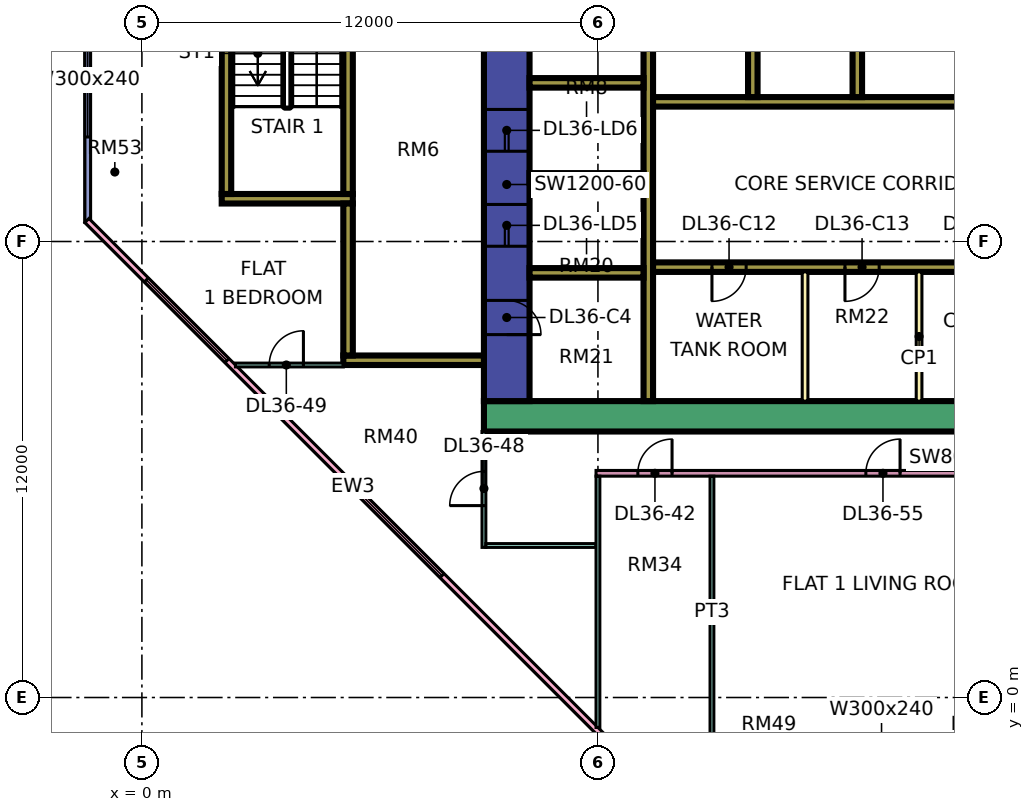
"""IFC4 building model, lengths in metres.
Left out: names, types, materials, properties, quantities, classifications, styles, units other than length and angle.
Written with IfcOpenShell. Run it as: python <this file> out.ifc"""

import sys

from ifc_helpers import new_model, si_unit, direction, frame, frame_2d, origin, place, context, subcontext, project, spatial, rectangle, extrude, element, fill, save


model = new_model("IFC4")
c1 = context("Model", 3, precision=1e-05, world=origin(), true_north=direction((0.0, 1.0)))
c2 = subcontext(c1, "Body", "Model", "MODEL_VIEW")
j1 = project(units=[si_unit("LENGTHUNIT", "METRE"), si_unit("PLANEANGLEUNIT", "RADIAN")], contexts=[c1])
p1 = place(None, origin())
s1 = spatial("IfcSite", under=j1, at=p1, CompositionType="ELEMENT")
p2 = place(p1, origin())
s2 = spatial("IfcBuilding", under=s1, at=p2, CompositionType="ELEMENT")
p3 = place(p2, frame((0.0, 0.0, 161.15)))
s3 = spatial("IfcBuildingStorey", under=s2, at=p3, CompositionType="ELEMENT", Elevation=161.15)
p4 = place(p3, frame((9.0, 7.4, 0.0), z_axis=(0.0, 0.0, 1.0), x_axis=(1.0, 0.0, 0.0)))
e1 = element("IfcWall", 1, at=p4, inside=s3, PredefinedType="SHEAR", context=c2, shape_type="SweptSolid", body=[
    extrude(rectangle(XDim=25.0, YDim=0.8, at=frame_2d((12.5, 0.0))), origin(), (0.0, 0.0, 1.0), 3.75),
])
p5 = place(p3, frame((9.6, 7.8, 0.0), z_axis=(0.0, 0.0, 1.0), x_axis=(0.0, 1.0, 0.0)))
e2 = element("IfcWall", 2, at=p5, inside=s3, PredefinedType="SHEAR", context=c2, shape_type="SweptSolid", body=[
    extrude(rectangle(XDim=11.4, YDim=1.2, at=frame_2d((5.7, 0.0))), origin(), (0.0, 0.0, 1.0), 3.75),
])
p6 = place(p5, frame((4.075, 0.0, 0.0)))
e3 = element("IfcOpeningElement", 3, at=p6, cuts=e2, PredefinedType="OPENING", context=c2, shape_type="SweptSolid", body=[
    extrude(rectangle(XDim=1.1, YDim=2.2, at=frame_2d((0.55, 1.1))), frame((0.0, 0.61, 0.0), z_axis=(0.0, -1.0, 0.0), x_axis=(1.0, 0.0, 0.0)), (0.0, 0.0, 1.0), 1.22),
])
p7 = place(p5, frame((6.575, 0.0, 0.0)))
e4 = element("IfcOpeningElement", 4, at=p7, cuts=e2, PredefinedType="OPENING", context=c2, shape_type="SweptSolid", body=[
    extrude(rectangle(XDim=1.1, YDim=2.2, at=frame_2d((0.55, 1.1))), frame((0.0, 0.61, 0.0), z_axis=(0.0, -1.0, 0.0), x_axis=(1.0, 0.0, 0.0)), (0.0, 0.0, 1.0), 1.22),
])
p8 = place(p5, frame((9.4, 0.0, 0.0)))
e5 = element("IfcOpeningElement", 5, at=p8, cuts=e2, PredefinedType="OPENING", context=c2, shape_type="SweptSolid", body=[
    extrude(rectangle(XDim=1.1, YDim=2.2, at=frame_2d((0.55, 1.1))), frame((0.0, 0.61, 0.0), z_axis=(0.0, -1.0, 0.0), x_axis=(1.0, 0.0, 0.0)), (0.0, 0.0, 1.0), 1.22),
])
p9 = place(p5, frame((1.75, 0.0, 0.0)))
e6 = element("IfcOpeningElement", 6, at=p9, cuts=e2, PredefinedType="OPENING", context=c2, shape_type="SweptSolid", body=[
    extrude(rectangle(XDim=0.9, YDim=2.1, at=frame_2d((0.45, 1.05))), frame((0.0, 0.61, 0.0), z_axis=(0.0, -1.0, 0.0), x_axis=(1.0, 0.0, 0.0)), (0.0, 0.0, 1.0), 1.22),
])
p10 = place(p3, frame((13.325, 7.8, 0.0), z_axis=(0.0, 0.0, 1.0), x_axis=(0.0, 1.0, 0.0)))
e7 = element("IfcWall", 7, at=p10, inside=s3, PredefinedType="SHEAR", context=c2, shape_type="SweptSolid", body=[
    extrude(rectangle(XDim=11.4, YDim=0.25, at=frame_2d((5.7, 0.0))), origin(), (0.0, 0.0, 1.0), 3.75),
])
p11 = place(p3, frame((13.45, 11.325, 0.0), z_axis=(0.0, 0.0, 1.0), x_axis=(1.0, 0.0, 0.0)))
e8 = element("IfcWall", 8, at=p11, inside=s3, PredefinedType="SHEAR", context=c2, shape_type="SweptSolid", body=[
    extrude(rectangle(XDim=19.75, YDim=0.25, at=frame_2d((9.875, 0.0))), origin(), (0.0, 0.0, 1.0), 3.75),
])
p12 = place(p11, frame((11.65, 0.0, 0.0)))
e9 = element("IfcOpeningElement", 9, at=p12, cuts=e8, PredefinedType="OPENING", context=c2, shape_type="SweptSolid", body=[
    extrude(rectangle(XDim=1.2, YDim=2.2, at=frame_2d((0.6, 1.1))), frame((0.0, 0.135, 0.0), z_axis=(0.0, -1.0, 0.0), x_axis=(1.0, 0.0, 0.0)), (0.0, 0.0, 1.0), 0.27),
])
p13 = place(p11, frame((14.4, 0.0, 0.0)))
e10 = element("IfcOpeningElement", 10, at=p13, cuts=e8, PredefinedType="OPENING", context=c2, shape_type="SweptSolid", body=[
    extrude(rectangle(XDim=1.2, YDim=2.2, at=frame_2d((0.6, 1.1))), frame((0.0, 0.135, 0.0), z_axis=(0.0, -1.0, 0.0), x_axis=(1.0, 0.0, 0.0)), (0.0, 0.0, 1.0), 0.27),
])
p14 = place(p11, frame((17.15, 0.0, 0.0)))
e11 = element("IfcOpeningElement", 11, at=p14, cuts=e8, PredefinedType="OPENING", context=c2, shape_type="SweptSolid", body=[
    extrude(rectangle(XDim=1.2, YDim=2.2, at=frame_2d((0.6, 1.1))), frame((0.0, 0.135, 0.0), z_axis=(0.0, -1.0, 0.0), x_axis=(1.0, 0.0, 0.0)), (0.0, 0.0, 1.0), 0.27),
])
p15 = place(p11, frame((1.55, 0.0, 0.0)))
e12 = element("IfcOpeningElement", 12, at=p15, cuts=e8, PredefinedType="OPENING", context=c2, shape_type="SweptSolid", body=[
    extrude(rectangle(XDim=0.9, YDim=2.1, at=frame_2d((0.45, 1.05))), frame((0.0, 0.135, 0.0), z_axis=(0.0, -1.0, 0.0), x_axis=(1.0, 0.0, 0.0)), (0.0, 0.0, 1.0), 0.27),
])
p16 = place(p11, frame((5.05, 0.0, 0.0)))
e13 = element("IfcOpeningElement", 13, at=p16, cuts=e8, PredefinedType="OPENING", context=c2, shape_type="SweptSolid", body=[
    extrude(rectangle(XDim=0.9, YDim=2.1, at=frame_2d((0.45, 1.05))), frame((0.0, 0.135, 0.0), z_axis=(0.0, -1.0, 0.0), x_axis=(1.0, 0.0, 0.0)), (0.0, 0.0, 1.0), 0.27),
])
p17 = place(p11, frame((8.425, 0.0, 0.0)))
e14 = element("IfcOpeningElement", 14, at=p17, cuts=e8, PredefinedType="OPENING", context=c2, shape_type="SweptSolid", body=[
    extrude(rectangle(XDim=0.9, YDim=2.1, at=frame_2d((0.45, 1.05))), frame((0.0, 0.135, 0.0), z_axis=(0.0, -1.0, 0.0), x_axis=(1.0, 0.0, 0.0)), (0.0, 0.0, 1.0), 0.27),
])
p18 = place(p3, frame((13.45, 15.675, 0.0), z_axis=(0.0, 0.0, 1.0), x_axis=(1.0, 0.0, 0.0)))
e15 = element("IfcWall", 15, at=p18, inside=s3, PredefinedType="SHEAR", context=c2, shape_type="SweptSolid", body=[
    extrude(rectangle(XDim=13.75, YDim=0.25, at=frame_2d((6.875, 0.0))), origin(), (0.0, 0.0, 1.0), 3.75),
])
p19 = place(p18, frame((11.65, 0.0, 0.0)))
e16 = element("IfcOpeningElement", 16, at=p19, cuts=e15, PredefinedType="OPENING", context=c2, shape_type="SweptSolid", body=[
    extrude(rectangle(XDim=1.2, YDim=2.2, at=frame_2d((0.6, 1.1))), frame((0.0, 0.135, 0.0), z_axis=(0.0, -1.0, 0.0), x_axis=(1.0, 0.0, 0.0)), (0.0, 0.0, 1.0), 0.27),
])
for number, where, z_axis, x_axis in (
    (17, (10.2, 11.175, 0.0), (0.0, 0.0, 1.0), (1.0, 0.0, 0.0)),
    (18, (10.2, 13.675, 0.0), (0.0, 0.0, 1.0), (1.0, 0.0, 0.0)),
    (19, (10.2, 16.175, 0.0), (0.0, 0.0, 1.0), (1.0, 0.0, 0.0)),
):
    element("IfcWall", number, at=place(p3, frame(where, z_axis=z_axis, x_axis=x_axis)), inside=s3, PredefinedType="SHEAR", context=c2, shape_type="SweptSolid", body=[
        extrude(rectangle(XDim=3.0, YDim=0.25, at=frame_2d((1.5, 0.0))), origin(), (0.0, 0.0, 1.0), 3.75),
    ])
for number, where, z_axis, x_axis in (
    (20, (16.075, 15.8, 0.0), (0.0, 0.0, 1.0), (0.0, 1.0, 0.0)),
    (21, (18.825, 15.8, 0.0), (0.0, 0.0, 1.0), (0.0, 1.0, 0.0)),
):
    element("IfcWall", number, at=place(p3, frame(where, z_axis=z_axis, x_axis=x_axis)), inside=s3, PredefinedType="SHEAR", context=c2, shape_type="SweptSolid", body=[
        extrude(rectangle(XDim=3.4, YDim=0.25, at=frame_2d((1.7, 0.0))), origin(), (0.0, 0.0, 1.0), 3.75),
    ])
p20 = place(p3, frame((2.1, 13.125, 0.0), z_axis=(0.0, 0.0, 1.0), x_axis=(1.0, 0.0, 0.0)))
e22 = element("IfcWall", 22, at=p20, inside=s3, PredefinedType="SHEAR", context=c2, shape_type="SweptSolid", body=[
    extrude(rectangle(XDim=3.45, YDim=0.25, at=frame_2d((1.725, 0.0))), origin(), (0.0, 0.0, 1.0), 3.75),
])
p21 = place(p3, frame((2.225, 13.25, 0.0), z_axis=(0.0, 0.0, 1.0), x_axis=(0.0, 1.0, 0.0)))
e23 = element("IfcWall", 23, at=p21, inside=s3, PredefinedType="SHEAR", context=c2, shape_type="SweptSolid", body=[
    extrude(rectangle(XDim=6.5, YDim=0.25, at=frame_2d((3.25, 0.0))), origin(), (0.0, 0.0, 1.0), 3.75),
])
p22 = place(p3, frame((5.425, 13.25, 0.0), z_axis=(0.0, 0.0, 1.0), x_axis=(0.0, 1.0, 0.0)))
e24 = element("IfcWall", 24, at=p22, inside=s3, PredefinedType="SHEAR", context=c2, shape_type="SweptSolid", body=[
    extrude(rectangle(XDim=6.5, YDim=0.25, at=frame_2d((3.25, 0.0))), origin(), (0.0, 0.0, 1.0), 3.75),
])
p23 = place(p22, frame((5.25, 0.0, 0.0)))
e25 = element("IfcOpeningElement", 25, at=p23, cuts=e24, PredefinedType="OPENING", context=c2, shape_type="SweptSolid", body=[
    extrude(rectangle(XDim=1.1, YDim=2.2, at=frame_2d((0.55, 1.1))), frame((0.0, 0.135, 0.0), z_axis=(0.0, -1.0, 0.0), x_axis=(1.0, 0.0, 0.0)), (0.0, 0.0, 1.0), 0.27),
])
p24 = place(p3, frame((5.3, 8.875, 0.0), z_axis=(0.0, 0.0, 1.0), x_axis=(1.0, 0.0, 0.0)))
e26 = element("IfcWall", 26, at=p24, inside=s3, PredefinedType="SHEAR", context=c2, shape_type="SweptSolid", body=[
    extrude(rectangle(XDim=3.7, YDim=0.25, at=frame_2d((1.85, 0.0))), origin(), (0.0, 0.0, 1.0), 3.75),
])
p25 = place(p3, frame((5.425, 9.0, 0.0), z_axis=(0.0, 0.0, 1.0), x_axis=(0.0, 1.0, 0.0)))
e27 = element("IfcWall", 27, at=p25, inside=s3, PredefinedType="SHEAR", context=c2, shape_type="SweptSolid", body=[
    extrude(rectangle(XDim=4.0, YDim=0.25, at=frame_2d((2.0, 0.0))), origin(), (0.0, 0.0, 1.0), 3.75),
])
p26 = place(p3, frame((-1.425, 23.925, 0.0), z_axis=(0.0, 0.0, 1.0), x_axis=(0.0, -1.0, 0.0)))
e28 = element("IfcWall", 28, at=p26, inside=s3, PredefinedType="SOLIDWALL", context=c2, shape_type="SweptSolid", body=[
    extrude(rectangle(XDim=11.425, YDim=0.15, at=frame_2d((5.712, 0.0))), origin(), (0.0, 0.0, 1.0), 3.35),
])
p27 = place(p26, frame((0.312, 0.0, 0.45)))
e29 = element("IfcOpeningElement", 29, at=p27, cuts=e28, PredefinedType="OPENING", context=c2, shape_type="SweptSolid", body=[
    extrude(rectangle(XDim=0.9, YDim=2.4, at=frame_2d((0.45, 1.2))), frame((0.0, 0.085, 0.0), z_axis=(0.0, -1.0, 0.0), x_axis=(1.0, 0.0, 0.0)), (0.0, 0.0, 1.0), 0.17),
])
p28 = place(p26, frame((6.175, 0.0, 0.45)))
e30 = element("IfcOpeningElement", 30, at=p28, cuts=e28, PredefinedType="OPENING", context=c2, shape_type="SweptSolid", body=[
    extrude(rectangle(XDim=3.0, YDim=2.4, at=frame_2d((1.5, 1.2))), frame((0.0, 0.085, 0.0), z_axis=(0.0, -1.0, 0.0), x_axis=(1.0, 0.0, 0.0)), (0.0, 0.0, 1.0), 0.17),
])
p29 = place(p3, frame((-1.447, 12.553, 0.0), z_axis=(0.0, 0.0, 1.0), x_axis=(0.707106781187, -0.707106781187, 0.0)))
e31 = element("IfcWall", 31, at=p29, inside=s3, PredefinedType="SOLIDWALL", context=c2, shape_type="SweptSolid", body=[
    extrude(rectangle(XDim=19.799, YDim=0.15, at=frame_2d((9.899, 0.0))), origin(), (0.0, 0.0, 1.0), 3.35),
])
p30 = place(p29, frame((2.212, 0.0, 0.45)))
e32 = element("IfcOpeningElement", 32, at=p30, cuts=e31, PredefinedType="OPENING", context=c2, shape_type="SweptSolid", body=[
    extrude(rectangle(XDim=3.0, YDim=2.4, at=frame_2d((1.5, 1.2))), frame((0.0, 0.085, 0.0), z_axis=(0.0, -1.0, 0.0), x_axis=(1.0, 0.0, 0.0)), (0.0, 0.0, 1.0), 0.17),
])
p31 = place(p29, frame((10.216, 0.0, 0.45)))
e33 = element("IfcOpeningElement", 33, at=p31, cuts=e31, PredefinedType="OPENING", context=c2, shape_type="SweptSolid", body=[
    extrude(rectangle(XDim=3.0, YDim=2.4, at=frame_2d((1.5, 1.2))), frame((0.0, 0.085, 0.0), z_axis=(0.0, -1.0, 0.0), x_axis=(1.0, 0.0, 0.0)), (0.0, 0.0, 1.0), 0.17),
])
for number, where, z_axis, x_axis in (
    (34, (17.45, 7.8, 0.0), (0.0, 0.0, 1.0), (0.0, 1.0, 0.0)),
    (35, (20.45, 7.8, 0.0), (0.0, 0.0, 1.0), (0.0, 1.0, 0.0)),
):
    element("IfcWall", number, at=place(p3, frame(where, z_axis=z_axis, x_axis=x_axis)), inside=s3, PredefinedType="PARTITIONING", context=c2, shape_type="SweptSolid", body=[
        extrude(rectangle(XDim=3.4, YDim=0.15, at=frame_2d((1.7, 0.0))), origin(), (0.0, 0.0, 1.0), 3.35),
    ])
p32 = place(p3, frame((2.461, 8.75, 0.0), z_axis=(0.0, 0.0, 1.0), x_axis=(1.0, 0.0, 0.0)))
e36 = element("IfcWall", 36, at=p32, inside=s3, PredefinedType="PARTITIONING", context=c2, shape_type="SweptSolid", body=[
    extrude(rectangle(XDim=2.839, YDim=0.1, at=frame_2d((1.419, 0.0))), origin(), (0.0, 0.0, 1.0), 3.35),
])
p33 = place(p32, frame((0.889, 0.0, 0.0)))
e37 = element("IfcOpeningElement", 37, at=p33, cuts=e36, PredefinedType="OPENING", context=c2, shape_type="SweptSolid", body=[
    extrude(rectangle(XDim=0.9, YDim=2.1, at=frame_2d((0.45, 1.05))), frame((0.0, 0.06, 0.0), z_axis=(0.0, -1.0, 0.0), x_axis=(1.0, 0.0, 0.0)), (0.0, 0.0, 1.0), 0.12),
])
p34 = place(p3, frame((9.0, 3.95, 0.0), z_axis=(0.0, 0.0, 1.0), x_axis=(0.0, 1.0, 0.0)))
e38 = element("IfcWall", 38, at=p34, inside=s3, PredefinedType="PARTITIONING", context=c2, shape_type="SweptSolid", body=[
    extrude(rectangle(XDim=3.05, YDim=0.1, at=frame_2d((1.525, 0.0))), origin(), (0.0, 0.0, 1.0), 3.35),
])
p35 = place(p34, frame((1.1, 0.0, 0.0)))
e39 = element("IfcOpeningElement", 39, at=p35, cuts=e38, PredefinedType="OPENING", context=c2, shape_type="SweptSolid", body=[
    extrude(rectangle(XDim=0.9, YDim=2.1, at=frame_2d((0.45, 1.05))), frame((0.0, 0.06, 0.0), z_axis=(0.0, -1.0, 0.0), x_axis=(1.0, 0.0, 0.0)), (0.0, 0.0, 1.0), 0.12),
])
p36 = place(p3, frame((9.05, 4.0, 0.0), z_axis=(0.0, 0.0, 1.0), x_axis=(1.0, 0.0, 0.0)))
e40 = element("IfcWall", 40, at=p36, inside=s3, PredefinedType="PARTITIONING", context=c2, shape_type="SweptSolid", body=[
    extrude(rectangle(XDim=2.9, YDim=0.1, at=frame_2d((1.45, 0.0))), origin(), (0.0, 0.0, 1.0), 3.35),
])
p37 = place(p3, frame((11.95, 5.9, 0.0), z_axis=(0.0, 0.0, 1.0), x_axis=(1.0, 0.0, 0.0)))
e41 = element("IfcWall", 41, at=p37, inside=s3, PredefinedType="PARTITIONING", context=c2, shape_type="SweptSolid", body=[
    extrude(rectangle(XDim=21.1, YDim=0.15, at=frame_2d((10.55, 0.0))), origin(), (0.0, 0.0, 1.0), 3.35),
])
p38 = place(p37, frame((1.1, 0.0, 0.0)))
e42 = element("IfcOpeningElement", 42, at=p38, cuts=e41, PredefinedType="OPENING", context=c2, shape_type="SweptSolid", body=[
    extrude(rectangle(XDim=0.9, YDim=2.1, at=frame_2d((0.45, 1.05))), frame((0.0, 0.085, 0.0), z_axis=(0.0, -1.0, 0.0), x_axis=(1.0, 0.0, 0.0)), (0.0, 0.0, 1.0), 0.17),
])
p39 = place(p37, frame((16.1, 0.0, 0.0)))
e43 = element("IfcOpeningElement", 43, at=p39, cuts=e41, PredefinedType="OPENING", context=c2, shape_type="SweptSolid", body=[
    extrude(rectangle(XDim=0.9, YDim=2.1, at=frame_2d((0.45, 1.05))), frame((0.0, 0.085, 0.0), z_axis=(0.0, -1.0, 0.0), x_axis=(1.0, 0.0, 0.0)), (0.0, 0.0, 1.0), 0.17),
])
p40 = place(p37, frame((7.1, 0.0, 0.0)))
e44 = element("IfcOpeningElement", 44, at=p40, cuts=e41, PredefinedType="OPENING", context=c2, shape_type="SweptSolid", body=[
    extrude(rectangle(XDim=0.9, YDim=2.1, at=frame_2d((0.45, 1.05))), frame((0.0, 0.085, 0.0), z_axis=(0.0, -1.0, 0.0), x_axis=(1.0, 0.0, 0.0)), (0.0, 0.0, 1.0), 0.17),
])
p41 = place(p3, frame((12.0, -0.788, 0.0), z_axis=(0.0, 0.0, 1.0), x_axis=(0.0, 1.0, 0.0)))
e45 = element("IfcWall", 45, at=p41, inside=s3, PredefinedType="PARTITIONING", context=c2, shape_type="SweptSolid", body=[
    extrude(rectangle(XDim=6.613, YDim=0.1, at=frame_2d((3.306, 0.0))), origin(), (0.0, 0.0, 1.0), 3.35),
])
p42 = place(p3, frame((15.0, -1.35, 0.0), z_axis=(0.0, 0.0, 1.0), x_axis=(0.0, 1.0, 0.0)))
e46 = element("IfcWall", 46, at=p42, inside=s3, PredefinedType="PARTITIONING", context=c2, shape_type="SweptSolid", body=[
    extrude(rectangle(XDim=7.175, YDim=0.1, at=frame_2d((3.587, 0.0))), origin(), (0.0, 0.0, 1.0), 3.35),
])
p43 = place(p28, origin())
e47 = element("IfcWindow", 47, at=p43, inside=s3, PartitioningType="SINGLE_PANEL", PredefinedType="WINDOW", context=c2, shape_type="SweptSolid", body=[
    extrude(rectangle(XDim=3.0, YDim=2.4, at=frame_2d((1.5, 1.2))), frame((0.0, 0.03, 0.0), z_axis=(0.0, -1.0, 0.0), x_axis=(1.0, 0.0, 0.0)), (0.0, 0.0, 1.0), 0.06),
])
fill(e30, e47)
p44 = place(p30, origin())
e48 = element("IfcWindow", 48, at=p44, inside=s3, PartitioningType="SINGLE_PANEL", PredefinedType="WINDOW", context=c2, shape_type="SweptSolid", body=[
    extrude(rectangle(XDim=3.0, YDim=2.4, at=frame_2d((1.5, 1.2))), frame((0.0, 0.03, 0.0), z_axis=(0.0, -1.0, 0.0), x_axis=(1.0, 0.0, 0.0)), (0.0, 0.0, 1.0), 0.06),
])
fill(e32, e48)
p45 = place(p31, origin())
e49 = element("IfcWindow", 49, at=p45, inside=s3, PartitioningType="SINGLE_PANEL", PredefinedType="WINDOW", context=c2, shape_type="SweptSolid", body=[
    extrude(rectangle(XDim=3.0, YDim=2.4, at=frame_2d((1.5, 1.2))), frame((0.0, 0.03, 0.0), z_axis=(0.0, -1.0, 0.0), x_axis=(1.0, 0.0, 0.0)), (0.0, 0.0, 1.0), 0.06),
])
fill(e33, e49)
p46 = place(p6, origin())
e50 = element("IfcDoor", 50, at=p46, inside=s3, OperationType="DOUBLE_DOOR_SLIDING", PredefinedType="DOOR", context=c2, shape_type="SweptSolid", body=[
    extrude(rectangle(XDim=1.1, YDim=2.2, at=frame_2d((0.55, 1.1))), frame((0.0, 0.025, 0.0), z_axis=(0.0, -1.0, 0.0), x_axis=(1.0, 0.0, 0.0)), (0.0, 0.0, 1.0), 0.05),
])
fill(e3, e50)
p47 = place(p7, origin())
e51 = element("IfcDoor", 51, at=p47, inside=s3, OperationType="DOUBLE_DOOR_SLIDING", PredefinedType="DOOR", context=c2, shape_type="SweptSolid", body=[
    extrude(rectangle(XDim=1.1, YDim=2.2, at=frame_2d((0.55, 1.1))), frame((0.0, 0.025, 0.0), z_axis=(0.0, -1.0, 0.0), x_axis=(1.0, 0.0, 0.0)), (0.0, 0.0, 1.0), 0.05),
])
fill(e4, e51)
p48 = place(p9, frame((0.9, 0.0, 0.0), z_axis=(0.0, 0.0, 1.0), x_axis=(-1.0, 0.0, 0.0)))
e52 = element("IfcDoor", 52, at=p48, inside=s3, OperationType="SINGLE_SWING_LEFT", PredefinedType="DOOR", context=c2, shape_type="SweptSolid", body=[
    extrude(rectangle(XDim=0.9, YDim=2.1, at=frame_2d((0.45, 1.05))), frame((0.0, 0.025, 0.0), z_axis=(0.0, -1.0, 0.0), x_axis=(1.0, 0.0, 0.0)), (0.0, 0.0, 1.0), 0.05),
])
fill(e6, e52)
p49 = place(p15, frame((0.9, 0.0, 0.0), z_axis=(0.0, 0.0, 1.0), x_axis=(-1.0, 0.0, 0.0)))
e53 = element("IfcDoor", 53, at=p49, inside=s3, OperationType="SINGLE_SWING_LEFT", PredefinedType="DOOR", context=c2, shape_type="SweptSolid", body=[
    extrude(rectangle(XDim=0.9, YDim=2.1, at=frame_2d((0.45, 1.05))), frame((0.0, 0.025, 0.0), z_axis=(0.0, -1.0, 0.0), x_axis=(1.0, 0.0, 0.0)), (0.0, 0.0, 1.0), 0.05),
])
fill(e12, e53)
p50 = place(p16, frame((0.9, 0.0, 0.0), z_axis=(0.0, 0.0, 1.0), x_axis=(-1.0, 0.0, 0.0)))
e54 = element("IfcDoor", 54, at=p50, inside=s3, OperationType="SINGLE_SWING_LEFT", PredefinedType="DOOR", context=c2, shape_type="SweptSolid", body=[
    extrude(rectangle(XDim=0.9, YDim=2.1, at=frame_2d((0.45, 1.05))), frame((0.0, 0.025, 0.0), z_axis=(0.0, -1.0, 0.0), x_axis=(1.0, 0.0, 0.0)), (0.0, 0.0, 1.0), 0.05),
])
fill(e13, e54)
p51 = place(p38, frame((0.9, 0.0, 0.0), z_axis=(0.0, 0.0, 1.0), x_axis=(-1.0, 0.0, 0.0)))
e55 = element("IfcDoor", 55, at=p51, inside=s3, OperationType="SINGLE_SWING_RIGHT", PredefinedType="DOOR", context=c2, shape_type="SweptSolid", body=[
    extrude(rectangle(XDim=0.9, YDim=2.1, at=frame_2d((0.45, 1.05))), frame((0.0, 0.025, 0.0), z_axis=(0.0, -1.0, 0.0), x_axis=(1.0, 0.0, 0.0)), (0.0, 0.0, 1.0), 0.05),
])
fill(e42, e55)
p52 = place(p35, origin())
e56 = element("IfcDoor", 56, at=p52, inside=s3, OperationType="SINGLE_SWING_LEFT", PredefinedType="DOOR", context=c2, shape_type="SweptSolid", body=[
    extrude(rectangle(XDim=0.9, YDim=2.1, at=frame_2d((0.45, 1.05))), frame((0.0, 0.025, 0.0), z_axis=(0.0, -1.0, 0.0), x_axis=(1.0, 0.0, 0.0)), (0.0, 0.0, 1.0), 0.05),
])
fill(e39, e56)
p53 = place(p33, frame((0.9, 0.0, 0.0), z_axis=(0.0, 0.0, 1.0), x_axis=(-1.0, 0.0, 0.0)))
e57 = element("IfcDoor", 57, at=p53, inside=s3, OperationType="SINGLE_SWING_RIGHT", PredefinedType="DOOR", context=c2, shape_type="SweptSolid", body=[
    extrude(rectangle(XDim=0.9, YDim=2.1, at=frame_2d((0.45, 1.05))), frame((0.0, 0.025, 0.0), z_axis=(0.0, -1.0, 0.0), x_axis=(1.0, 0.0, 0.0)), (0.0, 0.0, 1.0), 0.05),
])
fill(e37, e57)
p54 = place(p40, frame((0.9, 0.0, 0.0), z_axis=(0.0, 0.0, 1.0), x_axis=(-1.0, 0.0, 0.0)))
e58 = element("IfcDoor", 58, at=p54, inside=s3, OperationType="SINGLE_SWING_RIGHT", PredefinedType="DOOR", context=c2, shape_type="SweptSolid", body=[
    extrude(rectangle(XDim=0.9, YDim=2.1, at=frame_2d((0.45, 1.05))), frame((0.0, 0.025, 0.0), z_axis=(0.0, -1.0, 0.0), x_axis=(1.0, 0.0, 0.0)), (0.0, 0.0, 1.0), 0.05),
])
fill(e44, e58)
save(model, sys.argv[1])
